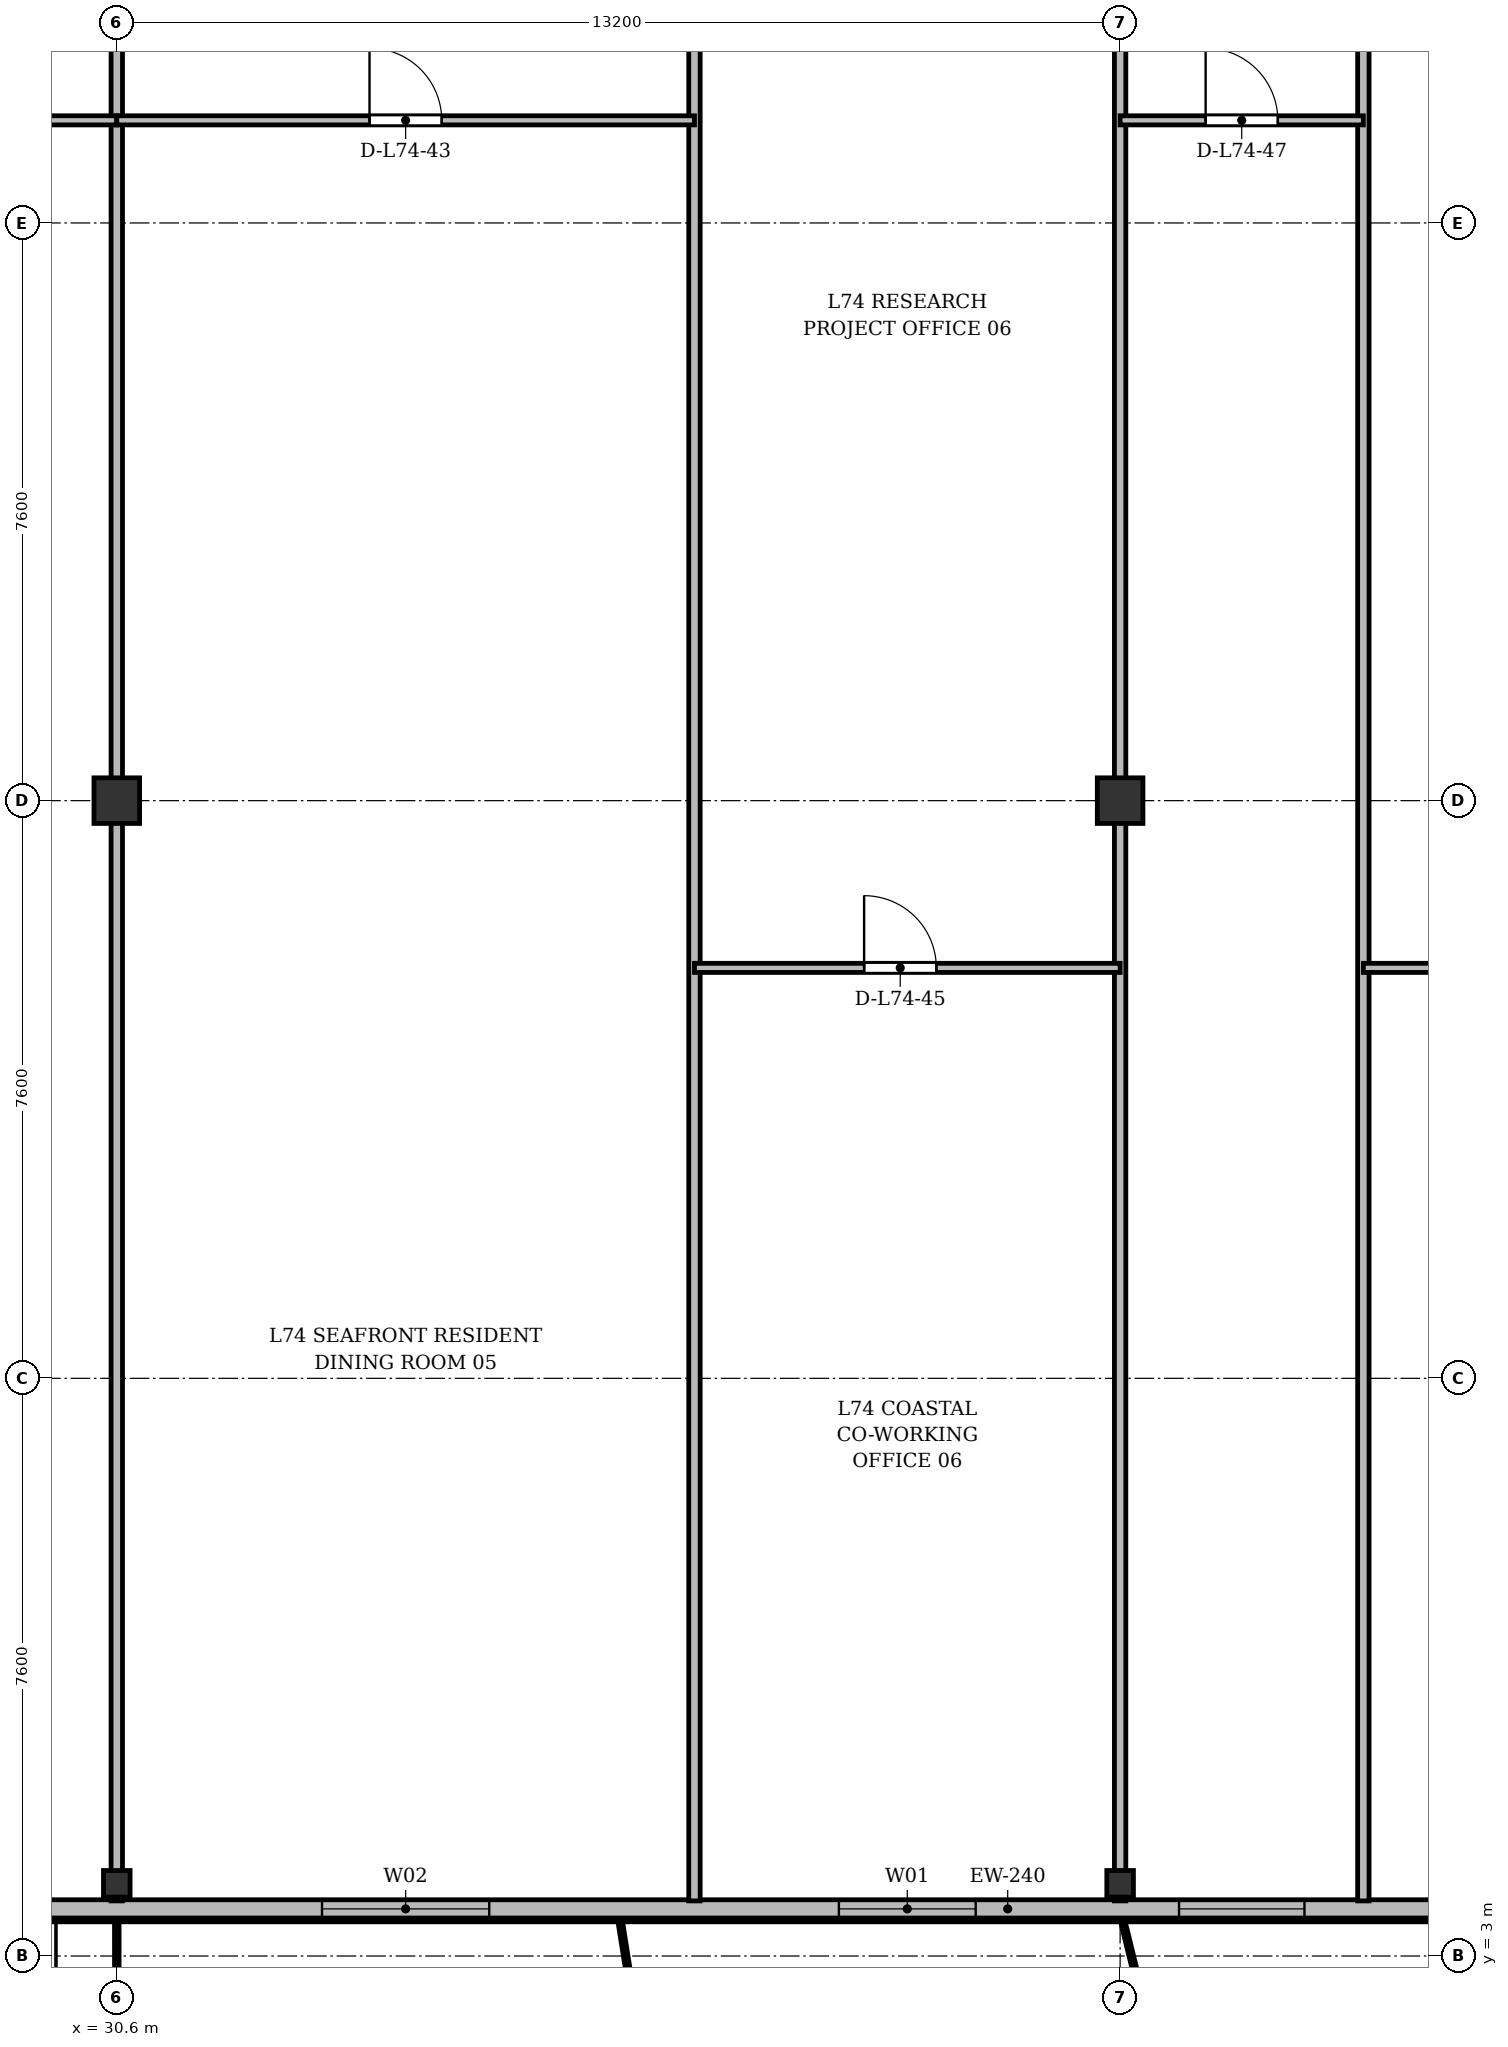
"""IFC4 building model, lengths in metres.
Left out: names, types, materials, properties, quantities, classifications, styles, units other than length and angle.
Written with IfcOpenShell. Run it as: python <this file> out.ifc"""

import sys

from ifc_helpers import new_model, si_unit, direction, frame, frame_2d, origin, origin_2d, place, context, subcontext, project, spatial, rectangle, i_section, extrude, source, transform, mapped, element, fill, save


model = new_model("IFC4")
c1 = context("Model", 3, precision=1e-05, world=origin(), true_north=direction((0.0, 1.0)))
c2 = subcontext(c1, "Body", "Model", "MODEL_VIEW")
j1 = project(units=[si_unit("LENGTHUNIT", "METRE"), si_unit("PLANEANGLEUNIT", "RADIAN")], contexts=[c1])
p1 = place(None, origin())
s1 = spatial("IfcSite", under=j1, at=p1, CompositionType="ELEMENT")
p2 = place(p1, origin())
s2 = spatial("IfcBuilding", under=s1, at=p2, CompositionType="ELEMENT")
p3 = place(p2, frame((0.0, 0.0, 284.7)))
s3 = spatial("IfcBuildingStorey", under=s2, at=p3, CompositionType="ELEMENT", Elevation=284.7)
m1 = source(origin(), c2, "Body", "SweptSolid", [
    extrude(i_section(OverallWidth=0.35, OverallDepth=0.35, WebThickness=0.018, FlangeThickness=0.028, at=origin_2d()), origin(), (0.0, 0.0, 1.0), 3.6),
])
p4 = place(p3, frame((30.6, 3.95, 0.0), z_axis=(0.0, 0.0, 1.0), x_axis=(1.0, 0.0, 0.0)))
e1 = element("IfcColumn", 1, at=p4, inside=s3, PredefinedType="COLUMN", context=c2, shape_type="MappedRepresentation", body=[
    mapped(m1, transform((0.0, 0.0, 0.0), x_axis=(1.0, 0.0, 0.0), y_axis=(0.0, 1.0, 0.0), z_axis=(0.0, 0.0, 1.0), scale=1.0)),
])
m2 = source(origin(), c2, "Body", "SweptSolid", [
    extrude(rectangle(XDim=0.6, YDim=0.6, at=origin_2d()), origin(), (0.0, 0.0, 1.0), 3.6),
])
p5 = place(p3, frame((30.6, 18.2, 0.0), z_axis=(0.0, 0.0, 1.0), x_axis=(1.0, 0.0, 0.0)))
e2 = element("IfcColumn", 2, at=p5, inside=s3, PredefinedType="COLUMN", context=c2, shape_type="MappedRepresentation", body=[
    mapped(m2, transform((0.0, 0.0, 0.0), x_axis=(1.0, 0.0, 0.0), y_axis=(0.0, 1.0, 0.0), z_axis=(0.0, 0.0, 1.0), scale=1.0)),
])
p6 = place(p3, frame((43.8, 3.95, 0.0), z_axis=(0.0, 0.0, 1.0), x_axis=(1.0, 0.0, 0.0)))
e3 = element("IfcColumn", 3, at=p6, inside=s3, PredefinedType="COLUMN", context=c2, shape_type="MappedRepresentation", body=[
    mapped(m1, transform((0.0, 0.0, 0.0), x_axis=(1.0, 0.0, 0.0), y_axis=(0.0, 1.0, 0.0), z_axis=(0.0, 0.0, 1.0), scale=1.0)),
])
p7 = place(p3, frame((43.8, 18.2, 0.0), z_axis=(0.0, 0.0, 1.0), x_axis=(1.0, 0.0, 0.0)))
e4 = element("IfcColumn", 4, at=p7, inside=s3, PredefinedType="COLUMN", context=c2, shape_type="MappedRepresentation", body=[
    mapped(m2, transform((0.0, 0.0, 0.0), x_axis=(1.0, 0.0, 0.0), y_axis=(0.0, 1.0, 0.0), z_axis=(0.0, 0.0, 1.0), scale=1.0)),
])
p8 = place(p3, frame((63.2, 3.62, 0.0), z_axis=(0.0, 0.0, 1.0), x_axis=(-1.0, 0.0, 0.0)))
e5 = element("IfcWall", 5, at=p8, inside=s3, PredefinedType="SOLIDWALL", context=c2, shape_type="SweptSolid", body=[
    extrude(rectangle(XDim=52.0, YDim=0.24, at=frame_2d((26.0, 0.0))), origin(), (0.0, 0.0, 1.0), 3.37),
])
p9 = place(p8, frame((0.92, 0.0, 0.9)))
e6 = element("IfcOpeningElement", 6, at=p9, cuts=e5, PredefinedType="OPENING", context=c2, shape_type="SweptSolid", body=[
    extrude(rectangle(XDim=1.65, YDim=1.85, at=frame_2d((0.825, 0.925))), frame((0.0, 0.13, 0.0), z_axis=(0.0, -1.0, 0.0), x_axis=(1.0, 0.0, 0.0)), (0.0, 0.0, 1.0), 0.26),
])
p10 = place(p8, frame((4.793, 0.0, 0.9)))
e7 = element("IfcOpeningElement", 7, at=p10, cuts=e5, PredefinedType="OPENING", context=c2, shape_type="SweptSolid", body=[
    extrude(rectangle(XDim=1.35, YDim=1.5, at=frame_2d((0.675, 0.75))), frame((0.0, 0.13, 0.0), z_axis=(0.0, -1.0, 0.0), x_axis=(1.0, 0.0, 0.0)), (0.0, 0.0, 1.0), 0.26),
])
p11 = place(p8, frame((6.685, 0.0, 0.0)))
e8 = element("IfcOpeningElement", 8, at=p11, cuts=e5, PredefinedType="OPENING", context=c2, shape_type="SweptSolid", body=[
    extrude(rectangle(XDim=1.2, YDim=2.2, at=frame_2d((0.6, 1.1))), frame((0.0, 0.13, 0.0), z_axis=(0.0, -1.0, 0.0), x_axis=(1.0, 0.0, 0.0)), (0.0, 0.0, 1.0), 0.26),
])
p12 = place(p8, frame((9.983, 0.0, 0.9)))
e9 = element("IfcOpeningElement", 9, at=p12, cuts=e5, PredefinedType="OPENING", context=c2, shape_type="SweptSolid", body=[
    extrude(rectangle(XDim=1.5, YDim=1.75, at=frame_2d((0.75, 0.875))), frame((0.0, 0.13, 0.0), z_axis=(0.0, -1.0, 0.0), x_axis=(1.0, 0.0, 0.0)), (0.0, 0.0, 1.0), 0.26),
])
p13 = place(p8, frame((13.2, 0.0, 0.9)))
e10 = element("IfcOpeningElement", 10, at=p13, cuts=e5, PredefinedType="OPENING", context=c2, shape_type="SweptSolid", body=[
    extrude(rectangle(XDim=2.0, YDim=1.95, at=frame_2d((1.0, 0.975))), frame((0.0, 0.13, 0.0), z_axis=(0.0, -1.0, 0.0), x_axis=(1.0, 0.0, 0.0)), (0.0, 0.0, 1.0), 0.26),
])
p14 = place(p8, frame((16.975, 0.0, 0.9)))
e11 = element("IfcOpeningElement", 11, at=p14, cuts=e5, PredefinedType="OPENING", context=c2, shape_type="SweptSolid", body=[
    extrude(rectangle(XDim=1.65, YDim=1.85, at=frame_2d((0.825, 0.925))), frame((0.0, 0.13, 0.0), z_axis=(0.0, -1.0, 0.0), x_axis=(1.0, 0.0, 0.0)), (0.0, 0.0, 1.0), 0.26),
])
p15 = place(p8, frame((21.3, 0.0, 0.9)))
e12 = element("IfcOpeningElement", 12, at=p15, cuts=e5, PredefinedType="OPENING", context=c2, shape_type="SweptSolid", body=[
    extrude(rectangle(XDim=1.8, YDim=1.8, at=frame_2d((0.9, 0.9))), frame((0.0, 0.13, 0.0), z_axis=(0.0, -1.0, 0.0), x_axis=(1.0, 0.0, 0.0)), (0.0, 0.0, 1.0), 0.26),
])
p16 = place(p8, frame((27.7, 0.0, 0.9)))
e13 = element("IfcOpeningElement", 13, at=p16, cuts=e5, PredefinedType="OPENING", context=c2, shape_type="SweptSolid", body=[
    extrude(rectangle(XDim=2.2, YDim=1.8, at=frame_2d((1.1, 0.9))), frame((0.0, 0.13, 0.0), z_axis=(0.0, -1.0, 0.0), x_axis=(1.0, 0.0, 0.0)), (0.0, 0.0, 1.0), 0.26),
])
p17 = place(p8, frame((33.873, 0.0, 0.0)))
e14 = element("IfcOpeningElement", 14, at=p17, cuts=e5, PredefinedType="OPENING", context=c2, shape_type="SweptSolid", body=[
    extrude(rectangle(XDim=1.2, YDim=2.2, at=frame_2d((0.6, 1.1))), frame((0.0, 0.13, 0.0), z_axis=(0.0, -1.0, 0.0), x_axis=(1.0, 0.0, 0.0)), (0.0, 0.0, 1.0), 0.26),
])
p18 = place(p8, frame((36.8, 0.0, 0.9)))
e15 = element("IfcOpeningElement", 15, at=p18, cuts=e5, PredefinedType="OPENING", context=c2, shape_type="SweptSolid", body=[
    extrude(rectangle(XDim=2.0, YDim=1.95, at=frame_2d((1.0, 0.975))), frame((0.0, 0.13, 0.0), z_axis=(0.0, -1.0, 0.0), x_axis=(1.0, 0.0, 0.0)), (0.0, 0.0, 1.0), 0.26),
])
p19 = place(p8, frame((40.475, 0.0, 0.9)))
e16 = element("IfcOpeningElement", 16, at=p19, cuts=e5, PredefinedType="OPENING", context=c2, shape_type="SweptSolid", body=[
    extrude(rectangle(XDim=1.65, YDim=1.85, at=frame_2d((0.825, 0.925))), frame((0.0, 0.13, 0.0), z_axis=(0.0, -1.0, 0.0), x_axis=(1.0, 0.0, 0.0)), (0.0, 0.0, 1.0), 0.26),
])
p20 = place(p8, frame((43.4, 0.0, 0.9)))
e17 = element("IfcOpeningElement", 17, at=p20, cuts=e5, PredefinedType="OPENING", context=c2, shape_type="SweptSolid", body=[
    extrude(rectangle(XDim=1.8, YDim=1.8, at=frame_2d((0.9, 0.9))), frame((0.0, 0.13, 0.0), z_axis=(0.0, -1.0, 0.0), x_axis=(1.0, 0.0, 0.0)), (0.0, 0.0, 1.0), 0.26),
])
p21 = place(p8, frame((45.99, 0.0, 0.9)))
e18 = element("IfcOpeningElement", 18, at=p21, cuts=e5, PredefinedType="OPENING", context=c2, shape_type="SweptSolid", body=[
    extrude(rectangle(XDim=1.2, YDim=1.65, at=frame_2d((0.6, 0.825))), frame((0.0, 0.13, 0.0), z_axis=(0.0, -1.0, 0.0), x_axis=(1.0, 0.0, 0.0)), (0.0, 0.0, 1.0), 0.26),
])
p22 = place(p8, frame((49.605, 0.0, 0.9)))
e19 = element("IfcOpeningElement", 19, at=p22, cuts=e5, PredefinedType="OPENING", context=c2, shape_type="SweptSolid", body=[
    extrude(rectangle(XDim=1.5, YDim=1.75, at=frame_2d((0.75, 0.875))), frame((0.0, 0.13, 0.0), z_axis=(0.0, -1.0, 0.0), x_axis=(1.0, 0.0, 0.0)), (0.0, 0.0, 1.0), 0.26),
])
p23 = place(p3, frame((30.6, 3.725, 0.0), z_axis=(0.0, 0.0, 1.0), x_axis=(0.0, 1.0, 0.0)))
e20 = element("IfcWall", 20, at=p23, inside=s3, PredefinedType="PARTITIONING", context=c2, shape_type="SweptSolid", body=[
    extrude(rectangle(XDim=27.275, YDim=0.15, at=frame_2d((13.637, 0.0))), origin(), (0.0, 0.0, 1.0), 2.87),
])
p24 = place(p3, frame((38.2, 3.725, 0.0), z_axis=(0.0, 0.0, 1.0), x_axis=(0.0, 1.0, 0.0)))
e21 = element("IfcWall", 21, at=p24, inside=s3, PredefinedType="PARTITIONING", context=c2, shape_type="SweptSolid", body=[
    extrude(rectangle(XDim=27.275, YDim=0.15, at=frame_2d((13.637, 0.0))), origin(), (0.0, 0.0, 1.0), 2.92),
])
p25 = place(p3, frame((43.8, 3.725, 0.0), z_axis=(0.0, 0.0, 1.0), x_axis=(0.0, 1.0, 0.0)))
e22 = element("IfcWall", 22, at=p25, inside=s3, PredefinedType="PARTITIONING", context=c2, shape_type="SweptSolid", body=[
    extrude(rectangle(XDim=27.275, YDim=0.15, at=frame_2d((13.637, 0.0))), origin(), (0.0, 0.0, 1.0), 2.87),
])
p26 = place(p3, frame((47.0, 3.725, 0.0), z_axis=(0.0, 0.0, 1.0), x_axis=(0.0, 1.0, 0.0)))
e23 = element("IfcWall", 23, at=p26, inside=s3, PredefinedType="PARTITIONING", context=c2, shape_type="SweptSolid", body=[
    extrude(rectangle(XDim=27.275, YDim=0.15, at=frame_2d((13.637, 0.0))), origin(), (0.0, 0.0, 1.0), 2.92),
])
p27 = place(p3, frame((27.4, 27.15, 0.0), z_axis=(0.0, 0.0, 1.0), x_axis=(1.0, 0.0, 0.0)))
e24 = element("IfcWall", 24, at=p27, inside=s3, PredefinedType="PARTITIONING", context=c2, shape_type="SweptSolid", body=[
    extrude(rectangle(XDim=3.2, YDim=0.12, at=frame_2d((1.6, 0.0))), origin(), (0.0, 0.0, 1.0), 2.87),
])
p28 = place(p27, frame((1.125, 0.0, 0.0)))
e25 = element("IfcOpeningElement", 25, at=p28, cuts=e24, PredefinedType="OPENING", context=c2, shape_type="SweptSolid", body=[
    extrude(rectangle(XDim=0.95, YDim=2.15, at=frame_2d((0.475, 1.075))), frame((0.0, 0.07, 0.0), z_axis=(0.0, -1.0, 0.0), x_axis=(1.0, 0.0, 0.0)), (0.0, 0.0, 1.0), 0.14),
])
p29 = place(p3, frame((30.6, 27.15, 0.0), z_axis=(0.0, 0.0, 1.0), x_axis=(1.0, 0.0, 0.0)))
e26 = element("IfcWall", 26, at=p29, inside=s3, PredefinedType="PARTITIONING", context=c2, shape_type="SweptSolid", body=[
    extrude(rectangle(XDim=7.6, YDim=0.12, at=frame_2d((3.8, 0.0))), origin(), (0.0, 0.0, 1.0), 2.87),
])
p30 = place(p29, frame((3.325, 0.0, 0.0)))
e27 = element("IfcOpeningElement", 27, at=p30, cuts=e26, PredefinedType="OPENING", context=c2, shape_type="SweptSolid", body=[
    extrude(rectangle(XDim=0.95, YDim=2.15, at=frame_2d((0.475, 1.075))), frame((0.0, 0.07, 0.0), z_axis=(0.0, -1.0, 0.0), x_axis=(1.0, 0.0, 0.0)), (0.0, 0.0, 1.0), 0.14),
])
p31 = place(p3, frame((38.2, 16.0, 0.0), z_axis=(0.0, 0.0, 1.0), x_axis=(1.0, 0.0, 0.0)))
e28 = element("IfcWall", 28, at=p31, inside=s3, PredefinedType="PARTITIONING", context=c2, shape_type="SweptSolid", body=[
    extrude(rectangle(XDim=5.6, YDim=0.12, at=frame_2d((2.8, 0.0))), origin(), (0.0, 0.0, 1.0), 2.87),
])
p32 = place(p31, frame((2.232, 0.0, 0.0)))
e29 = element("IfcOpeningElement", 29, at=p32, cuts=e28, PredefinedType="OPENING", context=c2, shape_type="SweptSolid", body=[
    extrude(rectangle(XDim=0.95, YDim=2.15, at=frame_2d((0.475, 1.075))), frame((0.0, 0.07, 0.0), z_axis=(0.0, -1.0, 0.0), x_axis=(1.0, 0.0, 0.0)), (0.0, 0.0, 1.0), 0.14),
])
p33 = place(p3, frame((43.8, 27.15, 0.0), z_axis=(0.0, 0.0, 1.0), x_axis=(1.0, 0.0, 0.0)))
e30 = element("IfcWall", 30, at=p33, inside=s3, PredefinedType="PARTITIONING", context=c2, shape_type="SweptSolid", body=[
    extrude(rectangle(XDim=3.2, YDim=0.12, at=frame_2d((1.6, 0.0))), origin(), (0.0, 0.0, 1.0), 2.87),
])
p34 = place(p33, frame((1.125, 0.0, 0.0)))
e31 = element("IfcOpeningElement", 31, at=p34, cuts=e30, PredefinedType="OPENING", context=c2, shape_type="SweptSolid", body=[
    extrude(rectangle(XDim=0.95, YDim=2.15, at=frame_2d((0.475, 1.075))), frame((0.0, 0.07, 0.0), z_axis=(0.0, -1.0, 0.0), x_axis=(1.0, 0.0, 0.0)), (0.0, 0.0, 1.0), 0.14),
])
p35 = place(p3, frame((47.0, 16.0, 0.0), z_axis=(0.0, 0.0, 1.0), x_axis=(1.0, 0.0, 0.0)))
e32 = element("IfcWall", 32, at=p35, inside=s3, PredefinedType="PARTITIONING", context=c2, shape_type="SweptSolid", body=[
    extrude(rectangle(XDim=4.0, YDim=0.12, at=frame_2d((2.0, 0.0))), origin(), (0.0, 0.0, 1.0), 2.87),
])
p36 = place(p35, frame((1.525, 0.0, 0.0)))
e33 = element("IfcOpeningElement", 33, at=p36, cuts=e32, PredefinedType="OPENING", context=c2, shape_type="SweptSolid", body=[
    extrude(rectangle(XDim=0.95, YDim=2.15, at=frame_2d((0.475, 1.075))), frame((0.0, 0.07, 0.0), z_axis=(0.0, -1.0, 0.0), x_axis=(1.0, 0.0, 0.0)), (0.0, 0.0, 1.0), 0.14),
])
m3 = source(origin(), c2, "Body", "SweptSolid", [
    extrude(rectangle(XDim=1.65, YDim=1.85, at=frame_2d((0.825, 0.925))), frame((0.0, 0.03, 0.0), z_axis=(0.0, -1.0, 0.0), x_axis=(1.0, 0.0, 0.0)), (0.0, 0.0, 1.0), 0.06),
])
p37 = place(p14, origin())
e34 = element("IfcWindow", 34, at=p37, inside=s3, PartitioningType="SINGLE_PANEL", PredefinedType="WINDOW", context=c2, shape_type="MappedRepresentation", body=[
    mapped(m3, transform((0.0, 0.0, 0.0), x_axis=(1.0, 0.0, 0.0), y_axis=(0.0, 1.0, 0.0), z_axis=(0.0, 0.0, 1.0), scale=1.0)),
])
fill(e11, e34)
m4 = source(origin(), c2, "Body", "SweptSolid", [
    extrude(rectangle(XDim=1.8, YDim=1.8, at=frame_2d((0.9, 0.9))), frame((0.0, 0.03, 0.0), z_axis=(0.0, -1.0, 0.0), x_axis=(1.0, 0.0, 0.0)), (0.0, 0.0, 1.0), 0.06),
])
p38 = place(p15, origin())
e35 = element("IfcWindow", 35, at=p38, inside=s3, PartitioningType="SINGLE_PANEL", PredefinedType="WINDOW", context=c2, shape_type="MappedRepresentation", body=[
    mapped(m4, transform((0.0, 0.0, 0.0), x_axis=(1.0, 0.0, 0.0), y_axis=(0.0, 1.0, 0.0), z_axis=(0.0, 0.0, 1.0), scale=1.0)),
])
fill(e12, e35)
m5 = source(origin(), c2, "Body", "SweptSolid", [
    extrude(rectangle(XDim=2.2, YDim=1.8, at=frame_2d((1.1, 0.9))), frame((0.0, 0.03, 0.0), z_axis=(0.0, -1.0, 0.0), x_axis=(1.0, 0.0, 0.0)), (0.0, 0.0, 1.0), 0.06),
])
p39 = place(p16, origin())
e36 = element("IfcWindow", 36, at=p39, inside=s3, PartitioningType="SINGLE_PANEL", PredefinedType="WINDOW", context=c2, shape_type="MappedRepresentation", body=[
    mapped(m5, transform((0.0, 0.0, 0.0), x_axis=(1.0, 0.0, 0.0), y_axis=(0.0, 1.0, 0.0), z_axis=(0.0, 0.0, 1.0), scale=1.0)),
])
fill(e13, e36)
m6 = source(origin(), c2, "Body", "SweptSolid", [
    extrude(rectangle(XDim=0.95, YDim=2.15, at=frame_2d((0.475, 1.075))), frame((0.0, 0.025, 0.0), z_axis=(0.0, -1.0, 0.0), x_axis=(1.0, 0.0, 0.0)), (0.0, 0.0, 1.0), 0.05),
])
p40 = place(p30, origin())
e37 = element("IfcDoor", 37, at=p40, inside=s3, OperationType="SINGLE_SWING_LEFT", PredefinedType="DOOR", context=c2, shape_type="MappedRepresentation", body=[
    mapped(m6, transform((0.0, 0.0, 0.0), x_axis=(1.0, 0.0, 0.0), y_axis=(0.0, 1.0, 0.0), z_axis=(0.0, 0.0, 1.0), scale=1.0)),
])
fill(e27, e37)
p41 = place(p32, origin())
e38 = element("IfcDoor", 38, at=p41, inside=s3, OperationType="SINGLE_SWING_LEFT", PredefinedType="DOOR", context=c2, shape_type="MappedRepresentation", body=[
    mapped(m6, transform((0.0, 0.0, 0.0), x_axis=(1.0, 0.0, 0.0), y_axis=(0.0, 1.0, 0.0), z_axis=(0.0, 0.0, 1.0), scale=1.0)),
])
fill(e29, e38)
p42 = place(p34, origin())
e39 = element("IfcDoor", 39, at=p42, inside=s3, OperationType="SINGLE_SWING_LEFT", PredefinedType="DOOR", context=c2, shape_type="MappedRepresentation", body=[
    mapped(m6, transform((0.0, 0.0, 0.0), x_axis=(1.0, 0.0, 0.0), y_axis=(0.0, 1.0, 0.0), z_axis=(0.0, 0.0, 1.0), scale=1.0)),
])
fill(e31, e39)
save(model, sys.argv[1])
